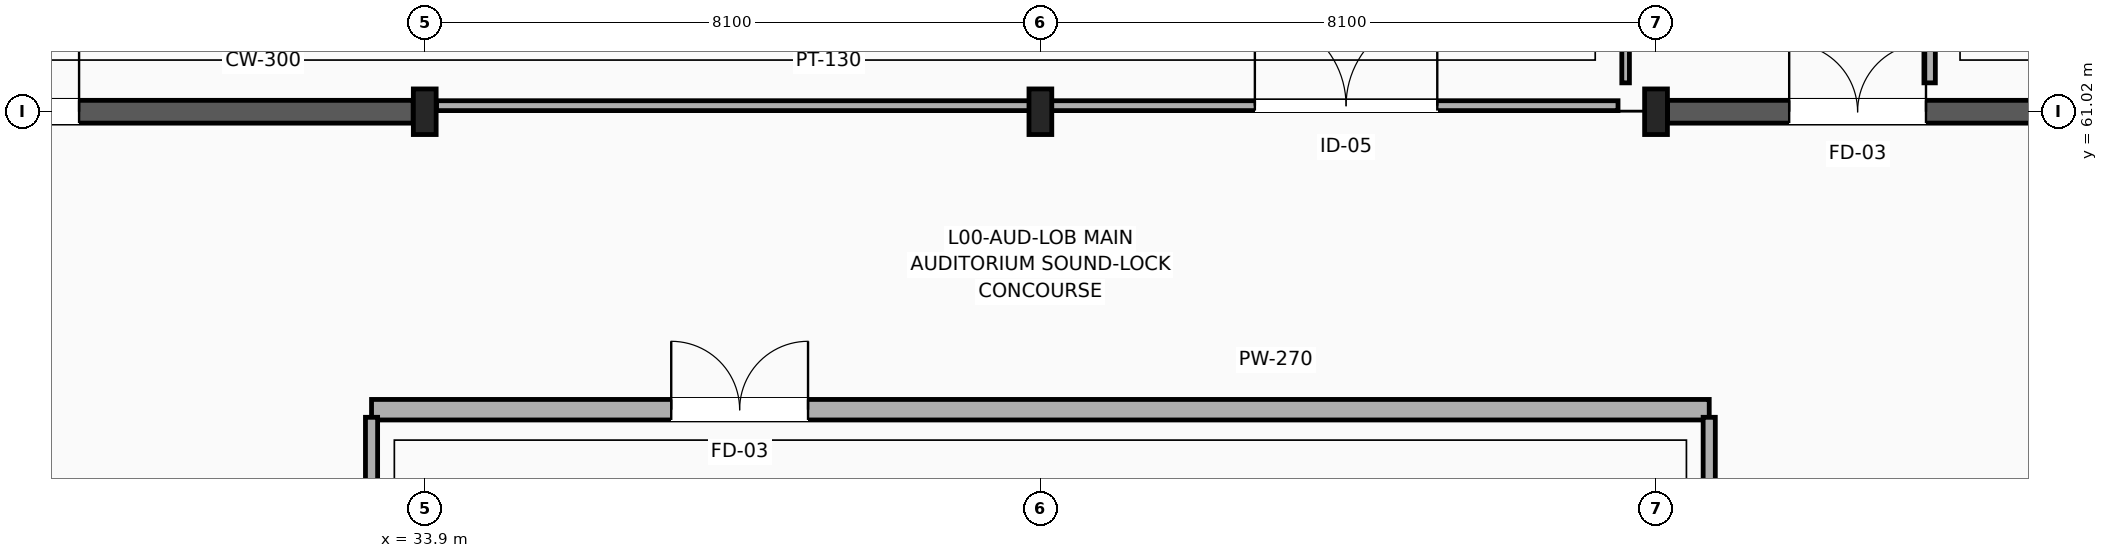
"""IFC4 building model, lengths in metres.
Left out: names, types, materials, properties, quantities, classifications, styles, units other than length and angle.
Written with IfcOpenShell. Run it as: python <this file> out.ifc"""

import sys

from ifc_helpers import new_model, si_unit, direction, frame, frame_2d, origin, origin_2d, place, context, subcontext, project, spatial, rectangle, i_section, extrude, element, fill, save


model = new_model("IFC4")
c1 = context("Model", 3, precision=1e-05, world=origin(), true_north=direction((0.0, 1.0)))
c2 = subcontext(c1, "Body", "Model", "MODEL_VIEW")
j1 = project(units=[si_unit("LENGTHUNIT", "METRE"), si_unit("PLANEANGLEUNIT", "RADIAN")], contexts=[c1])
p1 = place(None, origin())
s1 = spatial("IfcSite", under=j1, at=p1, CompositionType="ELEMENT")
p2 = place(p1, origin())
s2 = spatial("IfcBuilding", under=s1, at=p2, CompositionType="ELEMENT")
p3 = place(p2, origin())
s3 = spatial("IfcBuildingStorey", under=s2, at=p3, CompositionType="ELEMENT", Elevation=0.0)
for number, where, z_axis, x_axis in (
    (1, (33.9, 61.02, 0.0), (0.0, 0.0, 1.0), (1.0, 0.0, 0.0)),
    (2, (42.0, 61.02, 0.0), (0.0, 0.0, 1.0), (1.0, 0.0, 0.0)),
    (3, (50.1, 61.02, 0.0), (0.0, 0.0, 1.0), (1.0, 0.0, 0.0)),
):
    element("IfcColumn", number, at=place(p3, frame(where, z_axis=z_axis, x_axis=x_axis)), inside=s3, PredefinedType="COLUMN", context=c2, shape_type="SweptSolid", body=[
        extrude(i_section(OverallWidth=0.3, OverallDepth=0.6, WebThickness=0.015, FlangeThickness=0.03, FilletRadius=0.027, at=origin_2d()), origin(), (0.0, 0.0, 1.0), 5.4),
    ])
p4 = place(p3, frame((25.952, 61.02, 0.0), z_axis=(0.0, 0.0, 1.0), x_axis=(1.0, 0.0, 0.0)))
e4 = element("IfcWall", 4, at=p4, inside=s3, PredefinedType="SHEAR", context=c2, shape_type="SweptSolid", body=[
    extrude(rectangle(XDim=7.796, YDim=0.3, at=frame_2d((3.898, 0.0))), origin(), (0.0, 0.0, 1.0), 5.105),
])
p5 = place(p4, frame((1.6, 0.0, 0.0)))
e5 = element("IfcOpeningElement", 5, at=p5, cuts=e4, PredefinedType="OPENING", context=c2, shape_type="SweptSolid", body=[
    extrude(rectangle(XDim=1.8, YDim=2.4, at=frame_2d((0.9, 1.2))), frame((0.0, 0.16, 0.0), z_axis=(0.0, -1.0, 0.0), x_axis=(1.0, 0.0, 0.0)), (0.0, 0.0, 1.0), 0.32),
])
p6 = place(p3, frame((50.252, 61.02, 0.0), z_axis=(0.0, 0.0, 1.0), x_axis=(1.0, 0.0, 0.0)))
e6 = element("IfcWall", 6, at=p6, inside=s3, PredefinedType="SHEAR", context=c2, shape_type="SweptSolid", body=[
    extrude(rectangle(XDim=7.796, YDim=0.3, at=frame_2d((3.898, 0.0))), origin(), (0.0, 0.0, 1.0), 5.105),
])
p7 = place(p6, frame((1.6, 0.0, 0.0)))
e7 = element("IfcOpeningElement", 7, at=p7, cuts=e6, PredefinedType="OPENING", context=c2, shape_type="SweptSolid", body=[
    extrude(rectangle(XDim=1.8, YDim=2.4, at=frame_2d((0.9, 1.2))), frame((0.0, 0.16, 0.0), z_axis=(0.0, -1.0, 0.0), x_axis=(1.0, 0.0, 0.0)), (0.0, 0.0, 1.0), 0.32),
])
p8 = place(p3, frame((33.2, 57.1, 0.0), z_axis=(0.0, 0.0, 1.0), x_axis=(1.0, 0.0, 0.0)))
e8 = element("IfcWall", 8, at=p8, inside=s3, PredefinedType="SOLIDWALL", context=c2, shape_type="SweptSolid", body=[
    extrude(rectangle(XDim=17.6, YDim=0.27, at=frame_2d((8.8, 0.0))), origin(), (0.0, 0.0, 1.0), 5.085),
])
p9 = place(p8, frame((3.943, 0.0, 0.0)))
e9 = element("IfcOpeningElement", 9, at=p9, cuts=e8, PredefinedType="OPENING", context=c2, shape_type="SweptSolid", body=[
    extrude(rectangle(XDim=1.8, YDim=2.4, at=frame_2d((0.9, 1.2))), frame((0.0, 0.145, 0.0), z_axis=(0.0, -1.0, 0.0), x_axis=(1.0, 0.0, 0.0)), (0.0, 0.0, 1.0), 0.29),
])
p10 = place(p3, frame((34.055, 61.1, 0.0), z_axis=(0.0, 0.0, 1.0), x_axis=(1.0, 0.0, 0.0)))
e10 = element("IfcWall", 10, at=p10, inside=s3, PredefinedType="PARTITIONING", context=c2, shape_type="SweptSolid", body=[
    extrude(rectangle(XDim=15.545, YDim=0.13, at=frame_2d((7.772, 0.0))), origin(), (0.0, 0.0, 1.0), 4.537),
])
p11 = place(p10, frame((10.767, 0.0, 0.0)))
e11 = element("IfcOpeningElement", 11, at=p11, cuts=e10, PredefinedType="OPENING", context=c2, shape_type="SweptSolid", body=[
    extrude(rectangle(XDim=2.4, YDim=2.8, at=frame_2d((1.2, 1.4))), frame((0.0, 0.075, 0.0), z_axis=(0.0, -1.0, 0.0), x_axis=(1.0, 0.0, 0.0)), (0.0, 0.0, 1.0), 0.15),
])
p12 = place(p3, frame((49.7, 61.4, 0.0), z_axis=(0.0, 0.0, 1.0), x_axis=(0.0, 1.0, 0.0)))
e12 = element("IfcWall", 12, at=p12, inside=s3, PredefinedType="PARTITIONING", context=c2, shape_type="SweptSolid", body=[
    extrude(rectangle(XDim=13.9, YDim=0.1, at=frame_2d((6.95, 0.0))), origin(), (0.0, 0.0, 1.0), 5.085),
])
p13 = place(p12, frame((10.289, 0.0, 0.0)))
e13 = element("IfcOpeningElement", 13, at=p13, cuts=e12, PredefinedType="OPENING", context=c2, shape_type="SweptSolid", body=[
    extrude(rectangle(XDim=1.05, YDim=2.25, at=frame_2d((0.525, 1.125))), frame((0.0, 0.06, 0.0), z_axis=(0.0, -1.0, 0.0), x_axis=(1.0, 0.0, 0.0)), (0.0, 0.0, 1.0), 0.12),
])
p14 = place(p3, frame((53.7, 61.4, 0.0), z_axis=(0.0, 0.0, 1.0), x_axis=(0.0, 1.0, 0.0)))
e14 = element("IfcWall", 14, at=p14, inside=s3, PredefinedType="MOVABLE", context=c2, shape_type="SweptSolid", body=[
    extrude(rectangle(XDim=13.9, YDim=0.15, at=frame_2d((6.95, 0.0))), origin(), (0.0, 0.0, 1.0), 5.085),
])
p15 = place(p14, frame((10.172, 0.0, 0.0)))
e15 = element("IfcOpeningElement", 15, at=p15, cuts=e14, PredefinedType="OPENING", context=c2, shape_type="SweptSolid", body=[
    extrude(rectangle(XDim=1.15, YDim=2.25, at=frame_2d((0.575, 1.125))), frame((0.0, 0.085, 0.0), z_axis=(0.0, -1.0, 0.0), x_axis=(1.0, 0.0, 0.0)), (0.0, 0.0, 1.0), 0.17),
])
for number, where, z_axis, x_axis in (
    (16, (33.2, 29.5, 0.0), (0.0, 0.0, 1.0), (0.0, 1.0, 0.0)),
    (17, (50.8, 29.5, 0.0), (0.0, 0.0, 1.0), (0.0, 1.0, 0.0)),
):
    element("IfcWall", number, at=place(p3, frame(where, z_axis=z_axis, x_axis=x_axis)), inside=s3, PredefinedType="PARTITIONING", context=c2, shape_type="SweptSolid", body=[
        extrude(rectangle(XDim=27.5, YDim=0.16, at=frame_2d((13.75, 0.0))), origin(), (0.0, 0.0, 1.0), 5.085),
    ])
p16 = place(p5, origin())
e18 = element("IfcDoor", 18, at=p16, inside=s3, OperationType="DOUBLE_DOOR_SINGLE_SWING", PredefinedType="DOOR", context=c2, shape_type="SweptSolid", body=[
    extrude(rectangle(XDim=1.8, YDim=2.4, at=frame_2d((0.9, 1.2))), frame((0.0, 0.025, 0.0), z_axis=(0.0, -1.0, 0.0), x_axis=(1.0, 0.0, 0.0)), (0.0, 0.0, 1.0), 0.05),
])
fill(e5, e18)
p17 = place(p7, origin())
e19 = element("IfcDoor", 19, at=p17, inside=s3, OperationType="DOUBLE_DOOR_SINGLE_SWING", PredefinedType="DOOR", context=c2, shape_type="SweptSolid", body=[
    extrude(rectangle(XDim=1.8, YDim=2.4, at=frame_2d((0.9, 1.2))), frame((0.0, 0.025, 0.0), z_axis=(0.0, -1.0, 0.0), x_axis=(1.0, 0.0, 0.0)), (0.0, 0.0, 1.0), 0.05),
])
fill(e7, e19)
p18 = place(p9, origin())
e20 = element("IfcDoor", 20, at=p18, inside=s3, OperationType="DOUBLE_DOOR_SINGLE_SWING", PredefinedType="DOOR", context=c2, shape_type="SweptSolid", body=[
    extrude(rectangle(XDim=1.8, YDim=2.4, at=frame_2d((0.9, 1.2))), frame((0.0, 0.025, 0.0), z_axis=(0.0, -1.0, 0.0), x_axis=(1.0, 0.0, 0.0)), (0.0, 0.0, 1.0), 0.05),
])
fill(e9, e20)
p19 = place(p11, origin())
e21 = element("IfcDoor", 21, at=p19, inside=s3, OperationType="DOUBLE_DOOR_SINGLE_SWING", PredefinedType="DOOR", context=c2, shape_type="SweptSolid", body=[
    extrude(rectangle(XDim=2.4, YDim=2.8, at=frame_2d((1.2, 1.4))), frame((0.0, 0.025, 0.0), z_axis=(0.0, -1.0, 0.0), x_axis=(1.0, 0.0, 0.0)), (0.0, 0.0, 1.0), 0.05),
])
fill(e11, e21)
save(model, sys.argv[1])
